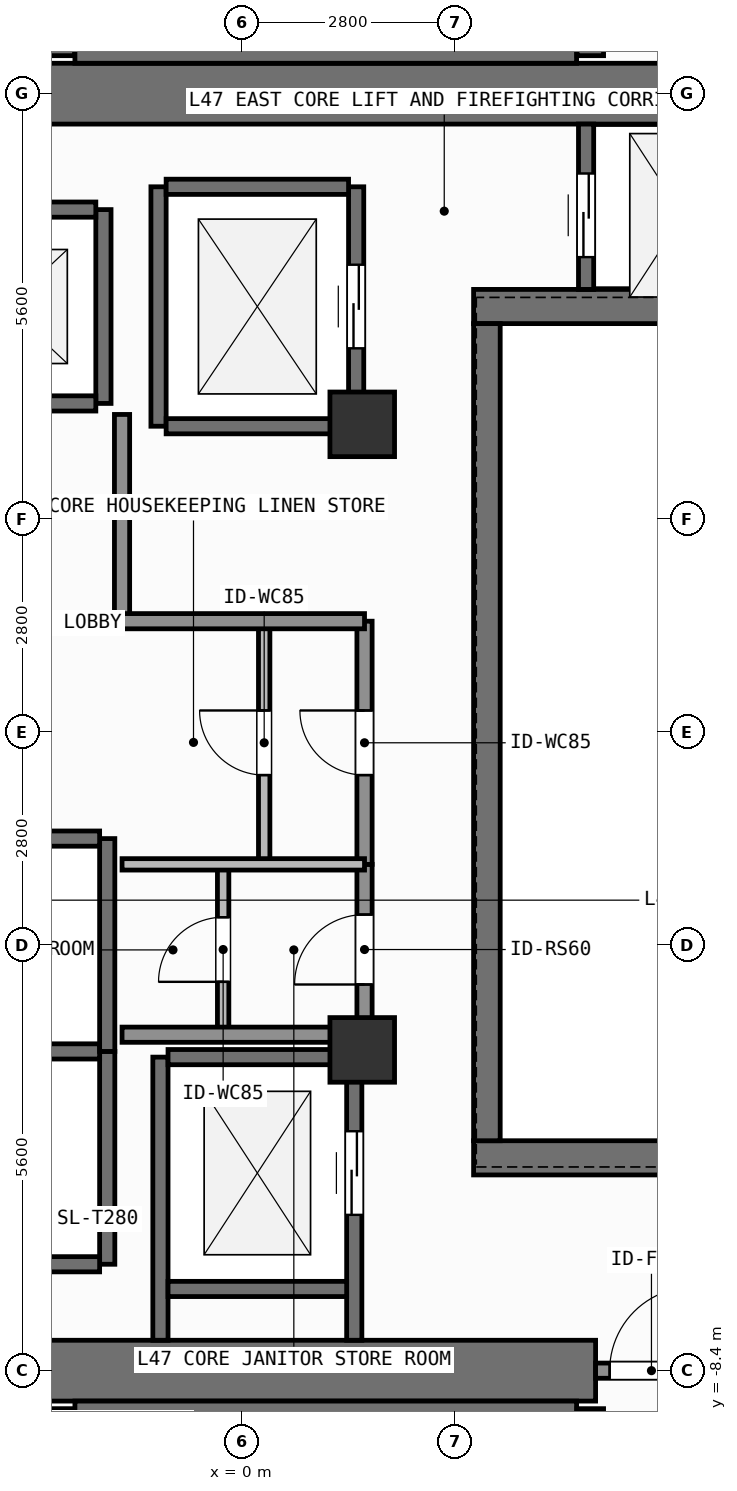
"""IFC4 building model, lengths in metres.
Left out: names, types, materials, properties, quantities, classifications, styles, units other than length and angle.
Written with IfcOpenShell. Run it as: python <this file> out.ifc"""

import sys

from ifc_helpers import new_model, si_unit, direction, frame, frame_2d, origin, origin_2d, place, context, subcontext, project, spatial, rectangle, extrude, element, fill, save


model = new_model("IFC4")
c1 = context("Model", 3, precision=1e-05, world=origin(), true_north=direction((0.0, 1.0)))
c2 = subcontext(c1, "Body", "Model", "MODEL_VIEW")
j1 = project(units=[si_unit("LENGTHUNIT", "METRE"), si_unit("PLANEANGLEUNIT", "RADIAN")], contexts=[c1])
p1 = place(None, origin())
s1 = spatial("IfcSite", under=j1, at=p1, CompositionType="ELEMENT")
p2 = place(p1, origin())
s2 = spatial("IfcBuilding", under=s1, at=p2, CompositionType="ELEMENT")
p3 = place(p2, frame((0.0, 0.0, 191.4)))
s3 = spatial("IfcBuildingStorey", under=s2, at=p3, CompositionType="ELEMENT", Elevation=191.4)
p4 = place(p3, frame((-2.62, -8.4, 0.0), z_axis=(0.0, 0.0, 1.0), x_axis=(1.0, 0.0, 0.0)))
e1 = element("IfcWall", 1, at=p4, inside=s3, PredefinedType="SHEAR", context=c2, shape_type="SweptSolid", body=[
    extrude(rectangle(XDim=7.27, YDim=0.8, at=frame_2d((3.635, 0.0))), origin(), (0.0, 0.0, 1.0), 3.9),
])
p5 = place(p3, frame((-7.55, 8.4, 0.0), z_axis=(0.0, 0.0, 1.0), x_axis=(1.0, 0.0, 0.0)))
e2 = element("IfcWall", 2, at=p5, inside=s3, PredefinedType="SHEAR", context=c2, shape_type="SweptSolid", body=[
    extrude(rectangle(XDim=16.35, YDim=0.8, at=frame_2d((8.175, 0.0))), origin(), (0.0, 0.0, 1.0), 3.9),
])
for number, where, z_axis, x_axis in (
    (3, (3.045, -5.6, 0.0), (0.0, 0.0, 1.0), (1.0, 0.0, 0.0)),
    (4, (3.045, 5.6, 0.0), (0.0, 0.0, 1.0), (1.0, 0.0, 0.0)),
):
    element("IfcWall", number, at=place(p3, frame(where, z_axis=z_axis, x_axis=x_axis)), inside=s3, PredefinedType="SHEAR", context=c2, shape_type="SweptSolid", body=[
        extrude(rectangle(XDim=5.755, YDim=0.45, at=frame_2d((2.877, 0.0))), origin(), (0.0, 0.0, 1.0), 3.9),
    ])
p6 = place(p3, frame((3.22, -5.375, 0.0), z_axis=(0.0, 0.0, 1.0), x_axis=(0.0, 1.0, 0.0)))
e5 = element("IfcWall", 5, at=p6, inside=s3, PredefinedType="SHEAR", context=c2, shape_type="SweptSolid", body=[
    extrude(rectangle(XDim=10.75, YDim=0.35, at=frame_2d((5.375, 0.0))), origin(), (0.0, 0.0, 1.0), 3.9),
])
p7 = place(p3, frame((-2.2, -8.913, 0.0), z_axis=(0.0, 0.0, 1.0), x_axis=(1.0, 0.0, 0.0)))
e6 = element("IfcWall", 6, at=p7, inside=s3, PredefinedType="SHEAR", context=c2, shape_type="SweptSolid", body=[
    extrude(rectangle(XDim=6.6, YDim=0.225, at=frame_2d((3.3, 0.0))), origin(), (0.0, 0.0, 1.0), 3.9),
])
p8 = place(p3, frame((-2.38, -11.825, 0.0), z_axis=(0.0, 0.0, 1.0), x_axis=(0.0, 1.0, 0.0)))
e7 = element("IfcWall", 7, at=p8, inside=s3, PredefinedType="SHEAR", context=c2, shape_type="SweptSolid", body=[
    extrude(rectangle(XDim=2.925, YDim=0.35, at=frame_2d((1.462, 0.0))), origin(), (0.0, 0.0, 1.0), 3.9),
])
p9 = place(p3, frame((4.58, -8.9, 0.0), z_axis=(0.0, 0.0, 1.0), x_axis=(0.0, -1.0, 0.0)))
e8 = element("IfcWall", 8, at=p9, inside=s3, PredefinedType="SHEAR", context=c2, shape_type="SweptSolid", body=[
    extrude(rectangle(XDim=2.925, YDim=0.35, at=frame_2d((1.462, 0.0))), origin(), (0.0, 0.0, 1.0), 3.9),
])
p10 = place(p9, frame((0.913, 0.0, 0.0)))
e9 = element("IfcOpeningElement", 9, at=p10, cuts=e8, PredefinedType="OPENING", context=c2, shape_type="SweptSolid", body=[
    extrude(rectangle(XDim=1.1, YDim=2.15, at=frame_2d((0.55, 1.075))), frame((0.0, 0.185, 0.0), z_axis=(0.0, -1.0, 0.0), x_axis=(1.0, 0.0, 0.0)), (0.0, 0.0, 1.0), 0.37),
])
p11 = place(p3, frame((-2.2, 8.913, 0.0), z_axis=(0.0, 0.0, 1.0), x_axis=(1.0, 0.0, 0.0)))
e10 = element("IfcWall", 10, at=p11, inside=s3, PredefinedType="SHEAR", context=c2, shape_type="SweptSolid", body=[
    extrude(rectangle(XDim=6.6, YDim=0.225, at=frame_2d((3.3, 0.0))), origin(), (0.0, 0.0, 1.0), 3.9),
])
p12 = place(p3, frame((-2.38, 8.9, 0.0), z_axis=(0.0, 0.0, 1.0), x_axis=(0.0, 1.0, 0.0)))
e11 = element("IfcWall", 11, at=p12, inside=s3, PredefinedType="SHEAR", context=c2, shape_type="SweptSolid", body=[
    extrude(rectangle(XDim=2.925, YDim=0.35, at=frame_2d((1.462, 0.0))), origin(), (0.0, 0.0, 1.0), 3.9),
])
p13 = place(p3, frame((4.58, 11.825, 0.0), z_axis=(0.0, 0.0, 1.0), x_axis=(0.0, -1.0, 0.0)))
e12 = element("IfcWall", 12, at=p13, inside=s3, PredefinedType="SHEAR", context=c2, shape_type="SweptSolid", body=[
    extrude(rectangle(XDim=2.925, YDim=0.35, at=frame_2d((1.462, 0.0))), origin(), (0.0, 0.0, 1.0), 3.9),
])
p14 = place(p13, frame((0.913, 0.0, 0.0)))
e13 = element("IfcOpeningElement", 13, at=p14, cuts=e12, PredefinedType="OPENING", context=c2, shape_type="SweptSolid", body=[
    extrude(rectangle(XDim=1.1, YDim=2.15, at=frame_2d((0.55, 1.075))), frame((0.0, 0.185, 0.0), z_axis=(0.0, -1.0, 0.0), x_axis=(1.0, 0.0, 0.0)), (0.0, 0.0, 1.0), 0.37),
])
for number, where, z_axis, x_axis in (
    (14, (1.58, -4.18, 0.0), (0.0, 0.0, 1.0), (1.0, 0.0, 0.0)),
    (15, (1.58, 4.05, 0.0), (0.0, 0.0, 1.0), (1.0, 0.0, 0.0)),
):
    element("IfcColumn", number, at=place(p3, frame(where, z_axis=z_axis, x_axis=x_axis)), inside=s3, PredefinedType="COLUMN", context=c2, shape_type="SweptSolid", body=[
        extrude(rectangle(XDim=0.85, YDim=0.85, at=origin_2d()), origin(), (0.0, 0.0, 1.0), 3.9),
    ])
p15 = place(p3, frame((-1.825, 4.325, 0.0), z_axis=(0.0, 0.0, 1.0), x_axis=(0.0, 1.0, 0.0)))
e16 = element("IfcWall", 16, at=p15, inside=s3, PredefinedType="SHEAR", context=c2, shape_type="SweptSolid", body=[
    extrude(rectangle(XDim=2.55, YDim=0.2, at=frame_2d((1.275, 0.0))), origin(), (0.0, 0.0, 1.0), 3.68),
])
p16 = place(p3, frame((-4.275, 4.325, 0.0), z_axis=(0.0, 0.0, 1.0), x_axis=(1.0, 0.0, 0.0)))
e17 = element("IfcWall", 17, at=p16, inside=s3, PredefinedType="SHEAR", context=c2, shape_type="SweptSolid", body=[
    extrude(rectangle(XDim=2.35, YDim=0.2, at=frame_2d((1.175, 0.0))), origin(), (0.0, 0.0, 1.0), 3.68),
])
p17 = place(p16, frame((0.625, 0.0, 0.0)))
e18 = element("IfcOpeningElement", 18, at=p17, cuts=e17, PredefinedType="OPENING", context=c2, shape_type="SweptSolid", body=[
    extrude(rectangle(XDim=1.1, YDim=2.2, at=frame_2d((0.55, 1.1))), frame((0.0, 0.11, 0.0), z_axis=(0.0, -1.0, 0.0), x_axis=(1.0, 0.0, 0.0)), (0.0, 0.0, 1.0), 0.22),
])
p18 = place(p3, frame((-4.275, 6.875, 0.0), z_axis=(0.0, 0.0, 1.0), x_axis=(1.0, 0.0, 0.0)))
e19 = element("IfcWall", 19, at=p18, inside=s3, PredefinedType="SHEAR", context=c2, shape_type="SweptSolid", body=[
    extrude(rectangle(XDim=2.35, YDim=0.2, at=frame_2d((1.175, 0.0))), origin(), (0.0, 0.0, 1.0), 3.68),
])
p19 = place(p3, frame((-1.775, -7.0, 0.0), z_axis=(0.0, 0.0, 1.0), x_axis=(0.0, 1.0, 0.0)))
e20 = element("IfcWall", 20, at=p19, inside=s3, PredefinedType="SHEAR", context=c2, shape_type="SweptSolid", body=[
    extrude(rectangle(XDim=2.8, YDim=0.2, at=frame_2d((1.4, 0.0))), origin(), (0.0, 0.0, 1.0), 3.68),
])
for number, where, z_axis, x_axis in (
    (21, (-4.325, -7.0, 0.0), (0.0, 0.0, 1.0), (1.0, 0.0, 0.0)),
    (22, (-4.325, -4.2, 0.0), (0.0, 0.0, 1.0), (1.0, 0.0, 0.0)),
):
    element("IfcWall", number, at=place(p3, frame(where, z_axis=z_axis, x_axis=x_axis)), inside=s3, PredefinedType="SHEAR", context=c2, shape_type="SweptSolid", body=[
        extrude(rectangle(XDim=2.45, YDim=0.2, at=frame_2d((1.225, 0.0))), origin(), (0.0, 0.0, 1.0), 3.68),
    ])
p20 = place(p3, frame((-1.775, -4.2, 0.0), z_axis=(0.0, 0.0, 1.0), x_axis=(0.0, 1.0, 0.0)))
e23 = element("IfcWall", 23, at=p20, inside=s3, PredefinedType="SHEAR", context=c2, shape_type="SweptSolid", body=[
    extrude(rectangle(XDim=2.8, YDim=0.2, at=frame_2d((1.4, 0.0))), origin(), (0.0, 0.0, 1.0), 3.68),
])
p21 = place(p3, frame((-4.325, -1.4, 0.0), z_axis=(0.0, 0.0, 1.0), x_axis=(1.0, 0.0, 0.0)))
e24 = element("IfcWall", 24, at=p21, inside=s3, PredefinedType="SHEAR", context=c2, shape_type="SweptSolid", body=[
    extrude(rectangle(XDim=2.45, YDim=0.2, at=frame_2d((1.225, 0.0))), origin(), (0.0, 0.0, 1.0), 3.68),
])
p22 = place(p3, frame((-1.1, 4.025, 0.0), z_axis=(0.0, 0.0, 1.0), x_axis=(0.0, 1.0, 0.0)))
e25 = element("IfcWall", 25, at=p22, inside=s3, PredefinedType="SHEAR", context=c2, shape_type="SweptSolid", body=[
    extrude(rectangle(XDim=3.15, YDim=0.2, at=frame_2d((1.575, 0.0))), origin(), (0.0, 0.0, 1.0), 3.68),
])
p23 = place(p3, frame((1.5, 4.025, 0.0), z_axis=(0.0, 0.0, 1.0), x_axis=(0.0, 1.0, 0.0)))
e26 = element("IfcWall", 26, at=p23, inside=s3, PredefinedType="SHEAR", context=c2, shape_type="SweptSolid", body=[
    extrude(rectangle(XDim=3.15, YDim=0.2, at=frame_2d((1.575, 0.0))), origin(), (0.0, 0.0, 1.0), 3.68),
])
p24 = place(p23, frame((1.025, 0.0, 0.0)))
e27 = element("IfcOpeningElement", 27, at=p24, cuts=e26, PredefinedType="OPENING", context=c2, shape_type="SweptSolid", body=[
    extrude(rectangle(XDim=1.1, YDim=2.2, at=frame_2d((0.55, 1.1))), frame((0.0, 0.11, 0.0), z_axis=(0.0, -1.0, 0.0), x_axis=(1.0, 0.0, 0.0)), (0.0, 0.0, 1.0), 0.22),
])
for number, where, z_axis, x_axis in (
    (28, (-1.0, 4.025, 0.0), (0.0, 0.0, 1.0), (1.0, 0.0, 0.0)),
    (29, (-1.0, 7.175, 0.0), (0.0, 0.0, 1.0), (1.0, 0.0, 0.0)),
):
    element("IfcWall", number, at=place(p3, frame(where, z_axis=z_axis, x_axis=x_axis)), inside=s3, PredefinedType="SHEAR", context=c2, shape_type="SweptSolid", body=[
        extrude(rectangle(XDim=2.4, YDim=0.2, at=frame_2d((1.2, 0.0))), origin(), (0.0, 0.0, 1.0), 3.68),
    ])
p25 = place(p3, frame((-1.075, -8.0, 0.0), z_axis=(0.0, 0.0, 1.0), x_axis=(0.0, 1.0, 0.0)))
e30 = element("IfcWall", 30, at=p25, inside=s3, PredefinedType="SHEAR", context=c2, shape_type="SweptSolid", body=[
    extrude(rectangle(XDim=3.725, YDim=0.2, at=frame_2d((1.863, 0.0))), origin(), (0.0, 0.0, 1.0), 3.68),
])
p26 = place(p3, frame((1.475, -8.0, 0.0), z_axis=(0.0, 0.0, 1.0), x_axis=(0.0, 1.0, 0.0)))
e31 = element("IfcWall", 31, at=p26, inside=s3, PredefinedType="SHEAR", context=c2, shape_type="SweptSolid", body=[
    extrude(rectangle(XDim=3.725, YDim=0.2, at=frame_2d((1.863, 0.0))), origin(), (0.0, 0.0, 1.0), 3.68),
])
p27 = place(p26, frame((1.65, 0.0, 0.0)))
e32 = element("IfcOpeningElement", 32, at=p27, cuts=e31, PredefinedType="OPENING", context=c2, shape_type="SweptSolid", body=[
    extrude(rectangle(XDim=1.1, YDim=2.2, at=frame_2d((0.55, 1.1))), frame((0.0, 0.11, 0.0), z_axis=(0.0, -1.0, 0.0), x_axis=(1.0, 0.0, 0.0)), (0.0, 0.0, 1.0), 0.22),
])
for number, where, z_axis, x_axis in (
    (33, (-0.975, -7.325, 0.0), (0.0, 0.0, 1.0), (1.0, 0.0, 0.0)),
    (34, (-0.975, -4.275, 0.0), (0.0, 0.0, 1.0), (1.0, 0.0, 0.0)),
):
    element("IfcWall", number, at=place(p3, frame(where, z_axis=z_axis, x_axis=x_axis)), inside=s3, PredefinedType="SHEAR", context=c2, shape_type="SweptSolid", body=[
        extrude(rectangle(XDim=2.35, YDim=0.2, at=frame_2d((1.175, 0.0))), origin(), (0.0, 0.0, 1.0), 3.68),
    ])
p28 = place(p3, frame((4.525, 5.825, 0.0), z_axis=(0.0, 0.0, 1.0), x_axis=(0.0, 1.0, 0.0)))
e35 = element("IfcWall", 35, at=p28, inside=s3, PredefinedType="SHEAR", context=c2, shape_type="SweptSolid", body=[
    extrude(rectangle(XDim=2.175, YDim=0.2, at=frame_2d((1.087, 0.0))), origin(), (0.0, 0.0, 1.0), 3.68),
])
p29 = place(p28, frame((0.425, 0.0, 0.0)))
e36 = element("IfcOpeningElement", 36, at=p29, cuts=e35, PredefinedType="OPENING", context=c2, shape_type="SweptSolid", body=[
    extrude(rectangle(XDim=1.1, YDim=2.2, at=frame_2d((0.55, 1.1))), frame((0.0, 0.11, 0.0), z_axis=(0.0, -1.0, 0.0), x_axis=(1.0, 0.0, 0.0)), (0.0, 0.0, 1.0), 0.22),
])
p30 = place(p3, frame((4.65, -8.4, 0.0), z_axis=(0.0, 0.0, 1.0), x_axis=(1.0, 0.0, 0.0)))
e37 = element("IfcWall", 37, at=p30, inside=s3, PredefinedType="SOLIDWALL", context=c2, shape_type="SweptSolid", body=[
    extrude(rectangle(XDim=1.47, YDim=0.2, at=frame_2d((0.735, 0.0))), origin(), (0.0, 0.0, 1.0), 2.82),
])
p31 = place(p30, frame((0.185, 0.0, 0.0)))
e38 = element("IfcOpeningElement", 38, at=p31, cuts=e37, PredefinedType="OPENING", context=c2, shape_type="SweptSolid", body=[
    extrude(rectangle(XDim=1.1, YDim=2.15, at=frame_2d((0.55, 1.075))), frame((0.0, 0.11, 0.0), z_axis=(0.0, -1.0, 0.0), x_axis=(1.0, 0.0, 0.0)), (0.0, 0.0, 1.0), 0.22),
])
p32 = place(p3, frame((-0.25, -3.98, 0.0), z_axis=(0.0, 0.0, 1.0), x_axis=(0.0, 1.0, 0.0)))
e39 = element("IfcWall", 39, at=p32, inside=s3, PredefinedType="PARTITIONING", context=c2, shape_type="SweptSolid", body=[
    extrude(rectangle(XDim=2.241, YDim=0.15, at=frame_2d((1.121, 0.0))), origin(), (0.0, 0.0, 1.0), 3.68),
])
p33 = place(p32, frame((0.696, 0.0, 0.0)))
e40 = element("IfcOpeningElement", 40, at=p33, cuts=e39, PredefinedType="OPENING", context=c2, shape_type="SweptSolid", body=[
    extrude(rectangle(XDim=0.85, YDim=2.1, at=frame_2d((0.425, 1.05))), frame((0.0, 0.085, 0.0), z_axis=(0.0, -1.0, 0.0), x_axis=(1.0, 0.0, 0.0)), (0.0, 0.0, 1.0), 0.17),
])
p34 = place(p3, frame((0.29, -1.739, 0.0), z_axis=(0.0, 0.0, 1.0), x_axis=(0.0, 1.0, 0.0)))
e41 = element("IfcWall", 41, at=p34, inside=s3, PredefinedType="PARTITIONING", context=c2, shape_type="SweptSolid", body=[
    extrude(rectangle(XDim=3.199, YDim=0.15, at=frame_2d((1.6, 0.0))), origin(), (0.0, 0.0, 1.0), 3.68),
])
p35 = place(p34, frame((1.175, 0.0, 0.0)))
e42 = element("IfcOpeningElement", 42, at=p35, cuts=e41, PredefinedType="OPENING", context=c2, shape_type="SweptSolid", body=[
    extrude(rectangle(XDim=0.85, YDim=2.1, at=frame_2d((0.425, 1.05))), frame((0.0, 0.085, 0.0), z_axis=(0.0, -1.0, 0.0), x_axis=(1.0, 0.0, 0.0)), (0.0, 0.0, 1.0), 0.17),
])
p36 = place(p3, frame((1.61, -3.98, 0.0), z_axis=(0.0, 0.0, 1.0), x_axis=(0.0, 1.0, 0.0)))
e43 = element("IfcWall", 43, at=p36, inside=s3, PredefinedType="SOLIDWALL", context=c2, shape_type="SweptSolid", body=[
    extrude(rectangle(XDim=2.241, YDim=0.2, at=frame_2d((1.121, 0.0))), origin(), (0.0, 0.0, 1.0), 3.68),
])
p37 = place(p36, frame((0.66, 0.0, 0.0)))
e44 = element("IfcOpeningElement", 44, at=p37, cuts=e43, PredefinedType="OPENING", context=c2, shape_type="SweptSolid", body=[
    extrude(rectangle(XDim=0.92, YDim=2.1, at=frame_2d((0.46, 1.05))), frame((0.0, 0.11, 0.0), z_axis=(0.0, -1.0, 0.0), x_axis=(1.0, 0.0, 0.0)), (0.0, 0.0, 1.0), 0.22),
])
p38 = place(p3, frame((1.61, -1.739, 0.0), z_axis=(0.0, 0.0, 1.0), x_axis=(0.0, 1.0, 0.0)))
e45 = element("IfcWall", 45, at=p38, inside=s3, PredefinedType="SOLIDWALL", context=c2, shape_type="SweptSolid", body=[
    extrude(rectangle(XDim=3.199, YDim=0.2, at=frame_2d((1.6, 0.0))), origin(), (0.0, 0.0, 1.0), 3.68),
])
p39 = place(p38, frame((1.175, 0.0, 0.0)))
e46 = element("IfcOpeningElement", 46, at=p39, cuts=e45, PredefinedType="OPENING", context=c2, shape_type="SweptSolid", body=[
    extrude(rectangle(XDim=0.85, YDim=2.1, at=frame_2d((0.425, 1.05))), frame((0.0, 0.11, 0.0), z_axis=(0.0, -1.0, 0.0), x_axis=(1.0, 0.0, 0.0)), (0.0, 0.0, 1.0), 0.22),
])
p40 = place(p3, frame((-1.58, 1.48, 0.0), z_axis=(0.0, 0.0, 1.0), x_axis=(0.0, 1.0, 0.0)))
e47 = element("IfcWall", 47, at=p40, inside=s3, PredefinedType="SOLIDWALL", context=c2, shape_type="SweptSolid", body=[
    extrude(rectangle(XDim=2.7, YDim=0.2, at=frame_2d((1.35, 0.0))), origin(), (0.0, 0.0, 1.0), 3.68),
])
for number, where, z_axis, x_axis in (
    (48, (-1.58, -3.98, 0.0), (0.0, 0.0, 1.0), (1.0, 0.0, 0.0)),
    (49, (-1.58, 1.46, 0.0), (0.0, 0.0, 1.0), (1.0, 0.0, 0.0)),
):
    element("IfcWall", number, at=place(p3, frame(where, z_axis=z_axis, x_axis=x_axis)), inside=s3, PredefinedType="SOLIDWALL", context=c2, shape_type="SweptSolid", body=[
        extrude(rectangle(XDim=3.19, YDim=0.2, at=frame_2d((1.595, 0.0))), origin(), (0.0, 0.0, 1.0), 3.68),
    ])
p41 = place(p3, frame((-1.58, -1.739, 0.0), z_axis=(0.0, 0.0, 1.0), x_axis=(1.0, 0.0, 0.0)))
e50 = element("IfcWall", 50, at=p41, inside=s3, PredefinedType="PARTITIONING", context=c2, shape_type="SweptSolid", body=[
    extrude(rectangle(XDim=3.19, YDim=0.15, at=frame_2d((1.595, 0.0))), origin(), (0.0, 0.0, 1.0), 3.68),
])
p42 = place(p24, origin())
e51 = element("IfcDoor", 51, at=p42, inside=s3, OperationType="SLIDING_TO_LEFT", PredefinedType="DOOR", context=c2, shape_type="SweptSolid", body=[
    extrude(rectangle(XDim=1.1, YDim=2.2, at=frame_2d((0.55, 1.1))), frame((0.0, 0.025, 0.0), z_axis=(0.0, -1.0, 0.0), x_axis=(1.0, 0.0, 0.0)), (0.0, 0.0, 1.0), 0.05),
])
fill(e27, e51)
p43 = place(p27, origin())
e52 = element("IfcDoor", 52, at=p43, inside=s3, OperationType="SLIDING_TO_LEFT", PredefinedType="DOOR", context=c2, shape_type="SweptSolid", body=[
    extrude(rectangle(XDim=1.1, YDim=2.2, at=frame_2d((0.55, 1.1))), frame((0.0, 0.025, 0.0), z_axis=(0.0, -1.0, 0.0), x_axis=(1.0, 0.0, 0.0)), (0.0, 0.0, 1.0), 0.05),
])
fill(e32, e52)
p44 = place(p29, origin())
e53 = element("IfcDoor", 53, at=p44, inside=s3, OperationType="SLIDING_TO_LEFT", PredefinedType="DOOR", context=c2, shape_type="SweptSolid", body=[
    extrude(rectangle(XDim=1.1, YDim=2.2, at=frame_2d((0.55, 1.1))), frame((0.0, 0.025, 0.0), z_axis=(0.0, -1.0, 0.0), x_axis=(1.0, 0.0, 0.0)), (0.0, 0.0, 1.0), 0.05),
])
fill(e36, e53)
p45 = place(p31, origin())
e54 = element("IfcDoor", 54, at=p45, inside=s3, OperationType="SINGLE_SWING_RIGHT", PredefinedType="DOOR", context=c2, shape_type="SweptSolid", body=[
    extrude(rectangle(XDim=1.1, YDim=2.15, at=frame_2d((0.55, 1.075))), frame((0.0, 0.025, 0.0), z_axis=(0.0, -1.0, 0.0), x_axis=(1.0, 0.0, 0.0)), (0.0, 0.0, 1.0), 0.05),
])
fill(e38, e54)
p46 = place(p33, origin())
e55 = element("IfcDoor", 55, at=p46, inside=s3, OperationType="SINGLE_SWING_LEFT", PredefinedType="DOOR", context=c2, shape_type="SweptSolid", body=[
    extrude(rectangle(XDim=0.85, YDim=2.1, at=frame_2d((0.425, 1.05))), frame((0.0, 0.025, 0.0), z_axis=(0.0, -1.0, 0.0), x_axis=(1.0, 0.0, 0.0)), (0.0, 0.0, 1.0), 0.05),
])
fill(e40, e55)
p47 = place(p35, origin())
e56 = element("IfcDoor", 56, at=p47, inside=s3, OperationType="SINGLE_SWING_RIGHT", PredefinedType="DOOR", context=c2, shape_type="SweptSolid", body=[
    extrude(rectangle(XDim=0.85, YDim=2.1, at=frame_2d((0.425, 1.05))), frame((0.0, 0.025, 0.0), z_axis=(0.0, -1.0, 0.0), x_axis=(1.0, 0.0, 0.0)), (0.0, 0.0, 1.0), 0.05),
])
fill(e42, e56)
p48 = place(p37, origin())
e57 = element("IfcDoor", 57, at=p48, inside=s3, OperationType="SINGLE_SWING_LEFT", PredefinedType="DOOR", context=c2, shape_type="SweptSolid", body=[
    extrude(rectangle(XDim=0.92, YDim=2.1, at=frame_2d((0.46, 1.05))), frame((0.0, 0.025, 0.0), z_axis=(0.0, -1.0, 0.0), x_axis=(1.0, 0.0, 0.0)), (0.0, 0.0, 1.0), 0.05),
])
fill(e44, e57)
p49 = place(p39, origin())
e58 = element("IfcDoor", 58, at=p49, inside=s3, OperationType="SINGLE_SWING_RIGHT", PredefinedType="DOOR", context=c2, shape_type="SweptSolid", body=[
    extrude(rectangle(XDim=0.85, YDim=2.1, at=frame_2d((0.425, 1.05))), frame((0.0, 0.025, 0.0), z_axis=(0.0, -1.0, 0.0), x_axis=(1.0, 0.0, 0.0)), (0.0, 0.0, 1.0), 0.05),
])
fill(e46, e58)
save(model, sys.argv[1])
